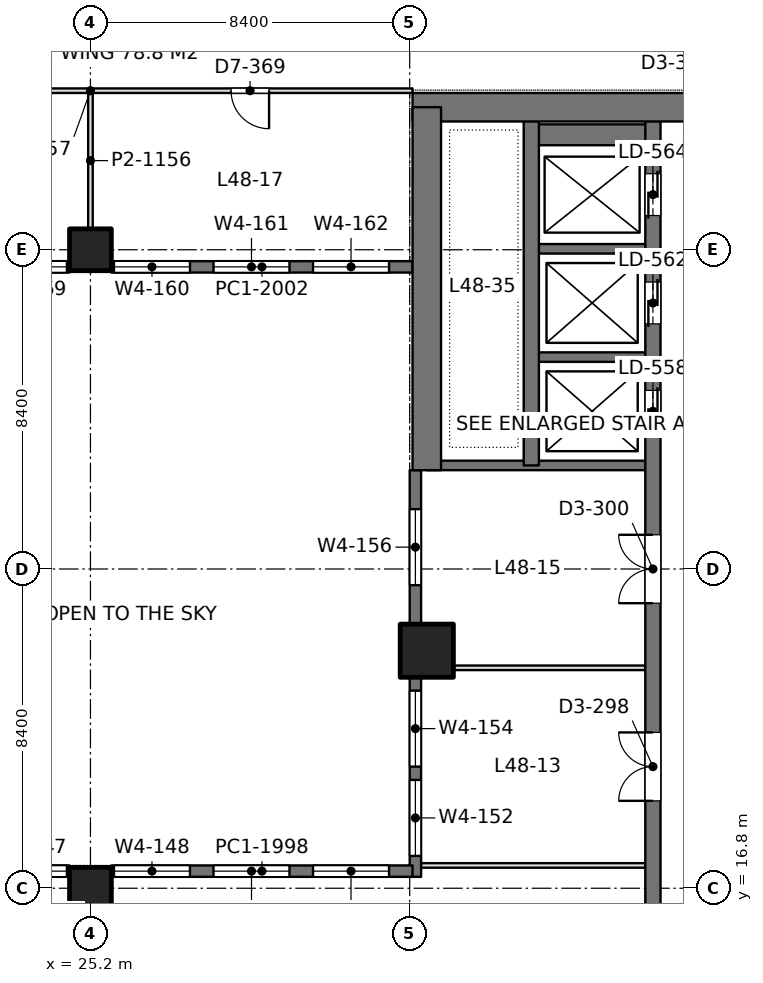
"""IFC4 building model, lengths in metres.
Left out: names, types, materials, properties, quantities, classifications, styles, units other than length and angle.
Written with IfcOpenShell. Run it as: python <this file> out.ifc"""

import sys

from ifc_helpers import new_model, si_unit, direction, frame, frame_2d, origin, origin_2d, place, context, subcontext, project, spatial, rectangle, extrude, element, fill, save


model = new_model("IFC4")
c1 = context("Model", 3, precision=1e-05, world=origin(), true_north=direction((0.0, 1.0)))
c2 = subcontext(c1, "Body", "Model", "MODEL_VIEW")
j1 = project(units=[si_unit("LENGTHUNIT", "METRE"), si_unit("PLANEANGLEUNIT", "RADIAN")], contexts=[c1])
p1 = place(None, origin())
s1 = spatial("IfcSite", under=j1, at=p1, CompositionType="ELEMENT")
p2 = place(p1, origin())
s2 = spatial("IfcBuilding", under=s1, at=p2, CompositionType="ELEMENT")
p3 = place(p2, frame((0.0, 0.0, 211.2)))
s3 = spatial("IfcBuildingStorey", under=s2, at=p3, CompositionType="ELEMENT", Elevation=211.2)
for number, where, z_axis, x_axis in (
    (1, (25.2, 16.8, 0.0), (0.0, 0.0, 1.0), (1.0, 0.0, 0.0)),
    (2, (25.2, 33.6, 0.0), (0.0, 0.0, 1.0), (1.0, 0.0, 0.0)),
):
    element("IfcColumn", number, at=place(p3, frame(where, z_axis=z_axis, x_axis=x_axis)), inside=s3, PredefinedType="COLUMN", context=c2, shape_type="SweptSolid", body=[
        extrude(rectangle(XDim=1.1, YDim=1.1, at=origin_2d()), origin(), (0.0, 0.0, 1.0), 4.2),
    ])
p4 = place(p3, frame((34.05, 23.05, 0.0), z_axis=(0.0, 0.0, 1.0), x_axis=(1.0, 0.0, 0.0)))
e3 = element("IfcColumn", 3, at=p4, inside=s3, PredefinedType="COLUMN", context=c2, shape_type="SweptSolid", body=[
    extrude(rectangle(XDim=1.4, YDim=1.4, at=origin_2d()), origin(), (0.0, 0.0, 1.0), 4.2),
])
p5 = place(p3, frame((33.675, 37.35, 0.0), z_axis=(0.0, 0.0, 1.0), x_axis=(1.0, 0.0, 0.0)))
e4 = element("IfcWall", 4, at=p5, inside=s3, PredefinedType="SHEAR", context=c2, shape_type="SweptSolid", body=[
    extrude(rectangle(XDim=17.85, YDim=0.75, at=frame_2d((8.925, 0.0))), origin(), (0.0, 0.0, 1.0), 4.2),
])
p6 = place(p5, frame((7.175, 0.0, 0.0)))
e5 = element("IfcOpeningElement", 5, at=p6, cuts=e4, PredefinedType="OPENING", context=c2, shape_type="SweptSolid", body=[
    extrude(rectangle(XDim=1.8, YDim=2.4, at=frame_2d((0.9, 1.2))), frame((0.0, 0.385, 0.0), z_axis=(0.0, -1.0, 0.0), x_axis=(1.0, 0.0, 0.0)), (0.0, 0.0, 1.0), 0.77),
])
p7 = place(p3, frame((34.05, 27.8, 0.0), z_axis=(0.0, 0.0, 1.0), x_axis=(0.0, 1.0, 0.0)))
e6 = element("IfcWall", 6, at=p7, inside=s3, PredefinedType="SHEAR", context=c2, shape_type="SweptSolid", body=[
    extrude(rectangle(XDim=9.55, YDim=0.75, at=frame_2d((4.775, 0.0))), origin(), (0.0, 0.0, 1.0), 4.2),
])
p8 = place(p3, frame((40.0, 13.05, 0.0), z_axis=(0.0, 0.0, 1.0), x_axis=(0.0, 1.0, 0.0)))
e7 = element("IfcWall", 7, at=p8, inside=s3, PredefinedType="SHEAR", context=c2, shape_type="SweptSolid", body=[
    extrude(rectangle(XDim=24.3, YDim=0.4, at=frame_2d((12.15, 0.0))), origin(), (0.0, 0.0, 1.0), 4.2),
])
p9 = place(p8, frame((15.75, 0.0, 0.0)))
e8 = element("IfcOpeningElement", 8, at=p9, cuts=e7, PredefinedType="OPENING", context=c2, shape_type="SweptSolid", body=[
    extrude(rectangle(XDim=1.1, YDim=2.2, at=frame_2d((0.55, 1.1))), frame((0.0, 0.21, 0.0), z_axis=(0.0, -1.0, 0.0), x_axis=(1.0, 0.0, 0.0)), (0.0, 0.0, 1.0), 0.42),
])
p10 = place(p8, frame((18.6, 0.0, 0.0)))
e9 = element("IfcOpeningElement", 9, at=p10, cuts=e7, PredefinedType="OPENING", context=c2, shape_type="SweptSolid", body=[
    extrude(rectangle(XDim=1.1, YDim=2.2, at=frame_2d((0.55, 1.1))), frame((0.0, 0.21, 0.0), z_axis=(0.0, -1.0, 0.0), x_axis=(1.0, 0.0, 0.0)), (0.0, 0.0, 1.0), 0.42),
])
p11 = place(p8, frame((21.45, 0.0, 0.0)))
e10 = element("IfcOpeningElement", 10, at=p11, cuts=e7, PredefinedType="OPENING", context=c2, shape_type="SweptSolid", body=[
    extrude(rectangle(XDim=1.1, YDim=2.2, at=frame_2d((0.55, 1.1))), frame((0.0, 0.21, 0.0), z_axis=(0.0, -1.0, 0.0), x_axis=(1.0, 0.0, 0.0)), (0.0, 0.0, 1.0), 0.42),
])
p12 = place(p8, frame((6.05, 0.0, 0.0)))
e11 = element("IfcOpeningElement", 11, at=p12, cuts=e7, PredefinedType="OPENING", context=c2, shape_type="SweptSolid", body=[
    extrude(rectangle(XDim=1.8, YDim=2.4, at=frame_2d((0.9, 1.2))), frame((0.0, 0.21, 0.0), z_axis=(0.0, -1.0, 0.0), x_axis=(1.0, 0.0, 0.0)), (0.0, 0.0, 1.0), 0.42),
])
p13 = place(p8, frame((11.25, 0.0, 0.0)))
e12 = element("IfcOpeningElement", 12, at=p13, cuts=e7, PredefinedType="OPENING", context=c2, shape_type="SweptSolid", body=[
    extrude(rectangle(XDim=1.8, YDim=2.4, at=frame_2d((0.9, 1.2))), frame((0.0, 0.21, 0.0), z_axis=(0.0, -1.0, 0.0), x_axis=(1.0, 0.0, 0.0)), (0.0, 0.0, 1.0), 0.42),
])
p14 = place(p3, frame((36.8, 27.925, 0.0), z_axis=(0.0, 0.0, 1.0), x_axis=(0.0, 1.0, 0.0)))
e13 = element("IfcWall", 13, at=p14, inside=s3, PredefinedType="SHEAR", context=c2, shape_type="SweptSolid", body=[
    extrude(rectangle(XDim=9.425, YDim=0.4, at=frame_2d((4.712, 0.0))), origin(), (0.0, 0.0, 1.0), 4.2),
])
p15 = place(p3, frame((40.0, 27.925, 0.0), z_axis=(0.0, 0.0, 1.0), x_axis=(-1.0, 0.0, 0.0)))
e14 = element("IfcWall", 14, at=p15, inside=s3, PredefinedType="SHEAR", context=c2, shape_type="SweptSolid", body=[
    extrude(rectangle(XDim=5.95, YDim=0.25, at=frame_2d((2.975, 0.0))), origin(), (0.0, 0.0, 1.0), 4.2),
])
for number, where, z_axis, x_axis in (
    (15, (40.0, 30.775, 0.0), (0.0, 0.0, 1.0), (-1.0, 0.0, 0.0)),
    (16, (40.0, 33.625, 0.0), (0.0, 0.0, 1.0), (-1.0, 0.0, 0.0)),
):
    element("IfcWall", number, at=place(p3, frame(where, z_axis=z_axis, x_axis=x_axis)), inside=s3, PredefinedType="SHEAR", context=c2, shape_type="SweptSolid", body=[
        extrude(rectangle(XDim=3.2, YDim=0.25, at=frame_2d((1.6, 0.0))), origin(), (0.0, 0.0, 1.0), 4.2),
    ])
p16 = place(p3, frame((40.0, 36.625, 0.0), z_axis=(0.0, 0.0, 1.0), x_axis=(-1.0, 0.0, 0.0)))
e17 = element("IfcWall", 17, at=p16, inside=s3, PredefinedType="SHEAR", context=c2, shape_type="SweptSolid", body=[
    extrude(rectangle(XDim=3.2, YDim=0.55, at=frame_2d((1.6, 0.0))), origin(), (0.0, 0.0, 1.0), 4.2),
])
p17 = place(p3, frame((33.75, 17.1, 0.0), z_axis=(0.0, 0.0, 1.0), x_axis=(0.0, 1.0, 0.0)))
e18 = element("IfcWall", 18, at=p17, inside=s3, PredefinedType="SOLIDWALL", context=c2, shape_type="SweptSolid", body=[
    extrude(rectangle(XDim=10.7, YDim=0.3, at=frame_2d((5.35, 0.0))), origin(), (0.0, 0.0, 1.0), 4.05),
])
p18 = place(p17, frame((0.55, 0.0, 0.9)))
e19 = element("IfcOpeningElement", 19, at=p18, cuts=e18, PredefinedType="OPENING", context=c2, shape_type="SweptSolid", body=[
    extrude(rectangle(XDim=2.0, YDim=1.9, at=frame_2d((1.0, 0.95))), frame((0.0, 0.16, 0.0), z_axis=(0.0, -1.0, 0.0), x_axis=(1.0, 0.0, 0.0)), (0.0, 0.0, 1.0), 0.32),
])
p19 = place(p17, frame((2.9, 0.0, 0.9)))
e20 = element("IfcOpeningElement", 20, at=p19, cuts=e18, PredefinedType="OPENING", context=c2, shape_type="SweptSolid", body=[
    extrude(rectangle(XDim=2.0, YDim=1.9, at=frame_2d((1.0, 0.95))), frame((0.0, 0.16, 0.0), z_axis=(0.0, -1.0, 0.0), x_axis=(1.0, 0.0, 0.0)), (0.0, 0.0, 1.0), 0.32),
])
p20 = place(p17, frame((7.675, 0.0, 0.9)))
e21 = element("IfcOpeningElement", 21, at=p20, cuts=e18, PredefinedType="OPENING", context=c2, shape_type="SweptSolid", body=[
    extrude(rectangle(XDim=2.0, YDim=1.9, at=frame_2d((1.0, 0.95))), frame((0.0, 0.16, 0.0), z_axis=(0.0, -1.0, 0.0), x_axis=(1.0, 0.0, 0.0)), (0.0, 0.0, 1.0), 0.32),
])
p21 = place(p3, frame((16.725, 17.25, 0.0), z_axis=(0.0, 0.0, 1.0), x_axis=(1.0, 0.0, 0.0)))
e22 = element("IfcWall", 22, at=p21, inside=s3, PredefinedType="SOLIDWALL", context=c2, shape_type="SweptSolid", body=[
    extrude(rectangle(XDim=7.925, YDim=0.3, at=frame_2d((3.962, 0.0))), origin(), (0.0, 0.0, 1.0), 4.05),
])
p22 = place(p21, frame((0.619, 0.0, 0.9)))
e23 = element("IfcOpeningElement", 23, at=p22, cuts=e22, PredefinedType="OPENING", context=c2, shape_type="SweptSolid", body=[
    extrude(rectangle(XDim=2.0, YDim=1.9, at=frame_2d((1.0, 0.95))), frame((0.0, 0.16, 0.0), z_axis=(0.0, -1.0, 0.0), x_axis=(1.0, 0.0, 0.0)), (0.0, 0.0, 1.0), 0.32),
])
p23 = place(p21, frame((3.238, 0.0, 0.9)))
e24 = element("IfcOpeningElement", 24, at=p23, cuts=e22, PredefinedType="OPENING", context=c2, shape_type="SweptSolid", body=[
    extrude(rectangle(XDim=2.0, YDim=1.9, at=frame_2d((1.0, 0.95))), frame((0.0, 0.16, 0.0), z_axis=(0.0, -1.0, 0.0), x_axis=(1.0, 0.0, 0.0)), (0.0, 0.0, 1.0), 0.32),
])
p24 = place(p21, frame((5.856, 0.0, 0.9)))
e25 = element("IfcOpeningElement", 25, at=p24, cuts=e22, PredefinedType="OPENING", context=c2, shape_type="SweptSolid", body=[
    extrude(rectangle(XDim=2.0, YDim=1.9, at=frame_2d((1.0, 0.95))), frame((0.0, 0.16, 0.0), z_axis=(0.0, -1.0, 0.0), x_axis=(1.0, 0.0, 0.0)), (0.0, 0.0, 1.0), 0.32),
])
p25 = place(p3, frame((25.75, 17.25, 0.0), z_axis=(0.0, 0.0, 1.0), x_axis=(1.0, 0.0, 0.0)))
e26 = element("IfcWall", 26, at=p25, inside=s3, PredefinedType="SOLIDWALL", context=c2, shape_type="SweptSolid", body=[
    extrude(rectangle(XDim=7.925, YDim=0.3, at=frame_2d((3.962, 0.0))), origin(), (0.0, 0.0, 1.0), 4.05),
])
p26 = place(p25, frame((0.069, 0.0, 0.9)))
e27 = element("IfcOpeningElement", 27, at=p26, cuts=e26, PredefinedType="OPENING", context=c2, shape_type="SweptSolid", body=[
    extrude(rectangle(XDim=2.0, YDim=1.9, at=frame_2d((1.0, 0.95))), frame((0.0, 0.16, 0.0), z_axis=(0.0, -1.0, 0.0), x_axis=(1.0, 0.0, 0.0)), (0.0, 0.0, 1.0), 0.32),
])
p27 = place(p25, frame((2.688, 0.0, 0.9)))
e28 = element("IfcOpeningElement", 28, at=p27, cuts=e26, PredefinedType="OPENING", context=c2, shape_type="SweptSolid", body=[
    extrude(rectangle(XDim=2.0, YDim=1.9, at=frame_2d((1.0, 0.95))), frame((0.0, 0.16, 0.0), z_axis=(0.0, -1.0, 0.0), x_axis=(1.0, 0.0, 0.0)), (0.0, 0.0, 1.0), 0.32),
])
p28 = place(p25, frame((5.306, 0.0, 0.9)))
e29 = element("IfcOpeningElement", 29, at=p28, cuts=e26, PredefinedType="OPENING", context=c2, shape_type="SweptSolid", body=[
    extrude(rectangle(XDim=2.0, YDim=1.9, at=frame_2d((1.0, 0.95))), frame((0.0, 0.16, 0.0), z_axis=(0.0, -1.0, 0.0), x_axis=(1.0, 0.0, 0.0)), (0.0, 0.0, 1.0), 0.32),
])
p29 = place(p3, frame((16.725, 33.15, 0.0), z_axis=(0.0, 0.0, 1.0), x_axis=(1.0, 0.0, 0.0)))
e30 = element("IfcWall", 30, at=p29, inside=s3, PredefinedType="SOLIDWALL", context=c2, shape_type="SweptSolid", body=[
    extrude(rectangle(XDim=7.925, YDim=0.3, at=frame_2d((3.962, 0.0))), origin(), (0.0, 0.0, 1.0), 4.05),
])
p30 = place(p29, frame((0.619, 0.0, 0.9)))
e31 = element("IfcOpeningElement", 31, at=p30, cuts=e30, PredefinedType="OPENING", context=c2, shape_type="SweptSolid", body=[
    extrude(rectangle(XDim=2.0, YDim=1.9, at=frame_2d((1.0, 0.95))), frame((0.0, 0.16, 0.0), z_axis=(0.0, -1.0, 0.0), x_axis=(1.0, 0.0, 0.0)), (0.0, 0.0, 1.0), 0.32),
])
p31 = place(p29, frame((3.238, 0.0, 0.9)))
e32 = element("IfcOpeningElement", 32, at=p31, cuts=e30, PredefinedType="OPENING", context=c2, shape_type="SweptSolid", body=[
    extrude(rectangle(XDim=2.0, YDim=1.9, at=frame_2d((1.0, 0.95))), frame((0.0, 0.16, 0.0), z_axis=(0.0, -1.0, 0.0), x_axis=(1.0, 0.0, 0.0)), (0.0, 0.0, 1.0), 0.32),
])
p32 = place(p29, frame((5.856, 0.0, 0.9)))
e33 = element("IfcOpeningElement", 33, at=p32, cuts=e30, PredefinedType="OPENING", context=c2, shape_type="SweptSolid", body=[
    extrude(rectangle(XDim=2.0, YDim=1.9, at=frame_2d((1.0, 0.95))), frame((0.0, 0.16, 0.0), z_axis=(0.0, -1.0, 0.0), x_axis=(1.0, 0.0, 0.0)), (0.0, 0.0, 1.0), 0.32),
])
p33 = place(p3, frame((25.75, 33.15, 0.0), z_axis=(0.0, 0.0, 1.0), x_axis=(1.0, 0.0, 0.0)))
e34 = element("IfcWall", 34, at=p33, inside=s3, PredefinedType="SOLIDWALL", context=c2, shape_type="SweptSolid", body=[
    extrude(rectangle(XDim=7.925, YDim=0.3, at=frame_2d((3.962, 0.0))), origin(), (0.0, 0.0, 1.0), 4.05),
])
p34 = place(p33, frame((0.069, 0.0, 0.9)))
e35 = element("IfcOpeningElement", 35, at=p34, cuts=e34, PredefinedType="OPENING", context=c2, shape_type="SweptSolid", body=[
    extrude(rectangle(XDim=2.0, YDim=1.9, at=frame_2d((1.0, 0.95))), frame((0.0, 0.16, 0.0), z_axis=(0.0, -1.0, 0.0), x_axis=(1.0, 0.0, 0.0)), (0.0, 0.0, 1.0), 0.32),
])
p35 = place(p33, frame((2.688, 0.0, 0.9)))
e36 = element("IfcOpeningElement", 36, at=p35, cuts=e34, PredefinedType="OPENING", context=c2, shape_type="SweptSolid", body=[
    extrude(rectangle(XDim=2.0, YDim=1.9, at=frame_2d((1.0, 0.95))), frame((0.0, 0.16, 0.0), z_axis=(0.0, -1.0, 0.0), x_axis=(1.0, 0.0, 0.0)), (0.0, 0.0, 1.0), 0.32),
])
p36 = place(p33, frame((5.306, 0.0, 0.9)))
e37 = element("IfcOpeningElement", 37, at=p36, cuts=e34, PredefinedType="OPENING", context=c2, shape_type="SweptSolid", body=[
    extrude(rectangle(XDim=2.0, YDim=1.9, at=frame_2d((1.0, 0.95))), frame((0.0, 0.16, 0.0), z_axis=(0.0, -1.0, 0.0), x_axis=(1.0, 0.0, 0.0)), (0.0, 0.0, 1.0), 0.32),
])
p37 = place(p3, frame((33.898, 17.4, 0.0), z_axis=(0.0, 0.0, 1.0), x_axis=(1.0, 0.0, 0.0)))
e38 = element("IfcWall", 38, at=p37, inside=s3, PredefinedType="PARTITIONING", context=c2, shape_type="SweptSolid", body=[
    extrude(rectangle(XDim=5.904, YDim=0.12, at=frame_2d((2.952, 0.0))), origin(), (0.0, 0.0, 1.0), 3.55),
])
p38 = place(p3, frame((34.749, 22.6, 0.0), z_axis=(0.0, 0.0, 1.0), x_axis=(1.0, 0.0, 0.0)))
e39 = element("IfcWall", 39, at=p38, inside=s3, PredefinedType="PARTITIONING", context=c2, shape_type="SweptSolid", body=[
    extrude(rectangle(XDim=5.053, YDim=0.12, at=frame_2d((2.526, 0.0))), origin(), (0.0, 0.0, 1.0), 4.05),
])
p39 = place(p3, frame((25.2, 34.149, 0.0), z_axis=(0.0, 0.0, 1.0), x_axis=(0.0, 1.0, 0.0)))
e40 = element("IfcWall", 40, at=p39, inside=s3, PredefinedType="PARTITIONING", context=c2, shape_type="SweptSolid", body=[
    extrude(rectangle(XDim=3.593, YDim=0.12, at=frame_2d((1.796, 0.0))), origin(), (0.0, 0.0, 1.0), 3.55),
])
p40 = place(p3, frame((16.725, 37.785, 0.0), z_axis=(0.0, 0.0, 1.0), x_axis=(1.0, 0.0, 0.0)))
e41 = element("IfcWall", 41, at=p40, inside=s3, PredefinedType="PARTITIONING", context=c2, shape_type="SweptSolid", body=[
    extrude(rectangle(XDim=16.95, YDim=0.12, at=frame_2d((8.475, 0.0))), origin(), (0.0, 0.0, 1.0), 3.55),
])
p41 = place(p40, frame((3.775, 0.0, 0.0)))
e42 = element("IfcOpeningElement", 42, at=p41, cuts=e41, PredefinedType="OPENING", context=c2, shape_type="SweptSolid", body=[
    extrude(rectangle(XDim=1.0, YDim=2.4, at=frame_2d((0.5, 1.2))), frame((0.0, 0.07, 0.0), z_axis=(0.0, -1.0, 0.0), x_axis=(1.0, 0.0, 0.0)), (0.0, 0.0, 1.0), 0.14),
])
p42 = place(p40, frame((12.175, 0.0, 0.0)))
e43 = element("IfcOpeningElement", 43, at=p42, cuts=e41, PredefinedType="OPENING", context=c2, shape_type="SweptSolid", body=[
    extrude(rectangle(XDim=1.0, YDim=2.4, at=frame_2d((0.5, 1.2))), frame((0.0, 0.07, 0.0), z_axis=(0.0, -1.0, 0.0), x_axis=(1.0, 0.0, 0.0)), (0.0, 0.0, 1.0), 0.14),
])
p43 = place(p18, origin())
e44 = element("IfcWindow", 44, at=p43, inside=s3, PartitioningType="SINGLE_PANEL", PredefinedType="WINDOW", context=c2, shape_type="SweptSolid", body=[
    extrude(rectangle(XDim=2.0, YDim=1.9, at=frame_2d((1.0, 0.95))), frame((0.0, 0.03, 0.0), z_axis=(0.0, -1.0, 0.0), x_axis=(1.0, 0.0, 0.0)), (0.0, 0.0, 1.0), 0.06),
])
fill(e19, e44)
p44 = place(p19, origin())
e45 = element("IfcWindow", 45, at=p44, inside=s3, PartitioningType="SINGLE_PANEL", PredefinedType="WINDOW", context=c2, shape_type="SweptSolid", body=[
    extrude(rectangle(XDim=2.0, YDim=1.9, at=frame_2d((1.0, 0.95))), frame((0.0, 0.03, 0.0), z_axis=(0.0, -1.0, 0.0), x_axis=(1.0, 0.0, 0.0)), (0.0, 0.0, 1.0), 0.06),
])
fill(e20, e45)
p45 = place(p20, origin())
e46 = element("IfcWindow", 46, at=p45, inside=s3, PartitioningType="SINGLE_PANEL", PredefinedType="WINDOW", context=c2, shape_type="SweptSolid", body=[
    extrude(rectangle(XDim=2.0, YDim=1.9, at=frame_2d((1.0, 0.95))), frame((0.0, 0.03, 0.0), z_axis=(0.0, -1.0, 0.0), x_axis=(1.0, 0.0, 0.0)), (0.0, 0.0, 1.0), 0.06),
])
fill(e21, e46)
p46 = place(p24, origin())
e47 = element("IfcWindow", 47, at=p46, inside=s3, PartitioningType="SINGLE_PANEL", PredefinedType="WINDOW", context=c2, shape_type="SweptSolid", body=[
    extrude(rectangle(XDim=2.0, YDim=1.9, at=frame_2d((1.0, 0.95))), frame((0.0, 0.03, 0.0), z_axis=(0.0, -1.0, 0.0), x_axis=(1.0, 0.0, 0.0)), (0.0, 0.0, 1.0), 0.06),
])
fill(e25, e47)
p47 = place(p26, origin())
e48 = element("IfcWindow", 48, at=p47, inside=s3, PartitioningType="SINGLE_PANEL", PredefinedType="WINDOW", context=c2, shape_type="SweptSolid", body=[
    extrude(rectangle(XDim=2.0, YDim=1.9, at=frame_2d((1.0, 0.95))), frame((0.0, 0.03, 0.0), z_axis=(0.0, -1.0, 0.0), x_axis=(1.0, 0.0, 0.0)), (0.0, 0.0, 1.0), 0.06),
])
fill(e27, e48)
p48 = place(p27, origin())
e49 = element("IfcWindow", 49, at=p48, inside=s3, PartitioningType="SINGLE_PANEL", PredefinedType="WINDOW", context=c2, shape_type="SweptSolid", body=[
    extrude(rectangle(XDim=2.0, YDim=1.9, at=frame_2d((1.0, 0.95))), frame((0.0, 0.03, 0.0), z_axis=(0.0, -1.0, 0.0), x_axis=(1.0, 0.0, 0.0)), (0.0, 0.0, 1.0), 0.06),
])
fill(e28, e49)
p49 = place(p28, origin())
e50 = element("IfcWindow", 50, at=p49, inside=s3, PartitioningType="SINGLE_PANEL", PredefinedType="WINDOW", context=c2, shape_type="SweptSolid", body=[
    extrude(rectangle(XDim=2.0, YDim=1.9, at=frame_2d((1.0, 0.95))), frame((0.0, 0.03, 0.0), z_axis=(0.0, -1.0, 0.0), x_axis=(1.0, 0.0, 0.0)), (0.0, 0.0, 1.0), 0.06),
])
fill(e29, e50)
p50 = place(p32, origin())
e51 = element("IfcWindow", 51, at=p50, inside=s3, PartitioningType="SINGLE_PANEL", PredefinedType="WINDOW", context=c2, shape_type="SweptSolid", body=[
    extrude(rectangle(XDim=2.0, YDim=1.9, at=frame_2d((1.0, 0.95))), frame((0.0, 0.03, 0.0), z_axis=(0.0, -1.0, 0.0), x_axis=(1.0, 0.0, 0.0)), (0.0, 0.0, 1.0), 0.06),
])
fill(e33, e51)
p51 = place(p34, origin())
e52 = element("IfcWindow", 52, at=p51, inside=s3, PartitioningType="SINGLE_PANEL", PredefinedType="WINDOW", context=c2, shape_type="SweptSolid", body=[
    extrude(rectangle(XDim=2.0, YDim=1.9, at=frame_2d((1.0, 0.95))), frame((0.0, 0.03, 0.0), z_axis=(0.0, -1.0, 0.0), x_axis=(1.0, 0.0, 0.0)), (0.0, 0.0, 1.0), 0.06),
])
fill(e35, e52)
p52 = place(p35, origin())
e53 = element("IfcWindow", 53, at=p52, inside=s3, PartitioningType="SINGLE_PANEL", PredefinedType="WINDOW", context=c2, shape_type="SweptSolid", body=[
    extrude(rectangle(XDim=2.0, YDim=1.9, at=frame_2d((1.0, 0.95))), frame((0.0, 0.03, 0.0), z_axis=(0.0, -1.0, 0.0), x_axis=(1.0, 0.0, 0.0)), (0.0, 0.0, 1.0), 0.06),
])
fill(e36, e53)
p53 = place(p36, origin())
e54 = element("IfcWindow", 54, at=p53, inside=s3, PartitioningType="SINGLE_PANEL", PredefinedType="WINDOW", context=c2, shape_type="SweptSolid", body=[
    extrude(rectangle(XDim=2.0, YDim=1.9, at=frame_2d((1.0, 0.95))), frame((0.0, 0.03, 0.0), z_axis=(0.0, -1.0, 0.0), x_axis=(1.0, 0.0, 0.0)), (0.0, 0.0, 1.0), 0.06),
])
fill(e37, e54)
p54 = place(p9, origin())
e55 = element("IfcDoor", 55, at=p54, inside=s3, OperationType="DOUBLE_DOOR_SLIDING", PredefinedType="DOOR", context=c2, shape_type="SweptSolid", body=[
    extrude(rectangle(XDim=1.1, YDim=2.2, at=frame_2d((0.55, 1.1))), frame((0.0, 0.025, 0.0), z_axis=(0.0, -1.0, 0.0), x_axis=(1.0, 0.0, 0.0)), (0.0, 0.0, 1.0), 0.05),
])
fill(e8, e55)
p55 = place(p10, origin())
e56 = element("IfcDoor", 56, at=p55, inside=s3, OperationType="DOUBLE_DOOR_SLIDING", PredefinedType="DOOR", context=c2, shape_type="SweptSolid", body=[
    extrude(rectangle(XDim=1.1, YDim=2.2, at=frame_2d((0.55, 1.1))), frame((0.0, 0.025, 0.0), z_axis=(0.0, -1.0, 0.0), x_axis=(1.0, 0.0, 0.0)), (0.0, 0.0, 1.0), 0.05),
])
fill(e9, e56)
p56 = place(p11, origin())
e57 = element("IfcDoor", 57, at=p56, inside=s3, OperationType="DOUBLE_DOOR_SLIDING", PredefinedType="DOOR", context=c2, shape_type="SweptSolid", body=[
    extrude(rectangle(XDim=1.1, YDim=2.2, at=frame_2d((0.55, 1.1))), frame((0.0, 0.025, 0.0), z_axis=(0.0, -1.0, 0.0), x_axis=(1.0, 0.0, 0.0)), (0.0, 0.0, 1.0), 0.05),
])
fill(e10, e57)
p57 = place(p12, origin())
e58 = element("IfcDoor", 58, at=p57, inside=s3, OperationType="DOUBLE_DOOR_SINGLE_SWING", PredefinedType="DOOR", context=c2, shape_type="SweptSolid", body=[
    extrude(rectangle(XDim=1.8, YDim=2.4, at=frame_2d((0.9, 1.2))), frame((0.0, 0.025, 0.0), z_axis=(0.0, -1.0, 0.0), x_axis=(1.0, 0.0, 0.0)), (0.0, 0.0, 1.0), 0.05),
])
fill(e11, e58)
p58 = place(p13, origin())
e59 = element("IfcDoor", 59, at=p58, inside=s3, OperationType="DOUBLE_DOOR_SINGLE_SWING", PredefinedType="DOOR", context=c2, shape_type="SweptSolid", body=[
    extrude(rectangle(XDim=1.8, YDim=2.4, at=frame_2d((0.9, 1.2))), frame((0.0, 0.025, 0.0), z_axis=(0.0, -1.0, 0.0), x_axis=(1.0, 0.0, 0.0)), (0.0, 0.0, 1.0), 0.05),
])
fill(e12, e59)
p59 = place(p42, frame((1.0, 0.0, 0.0), z_axis=(0.0, 0.0, 1.0), x_axis=(-1.0, 0.0, 0.0)))
e60 = element("IfcDoor", 60, at=p59, inside=s3, OperationType="SINGLE_SWING_LEFT", PredefinedType="DOOR", context=c2, shape_type="SweptSolid", body=[
    extrude(rectangle(XDim=1.0, YDim=2.4, at=frame_2d((0.5, 1.2))), frame((0.0, 0.025, 0.0), z_axis=(0.0, -1.0, 0.0), x_axis=(1.0, 0.0, 0.0)), (0.0, 0.0, 1.0), 0.05),
])
fill(e43, e60)
save(model, sys.argv[1])
